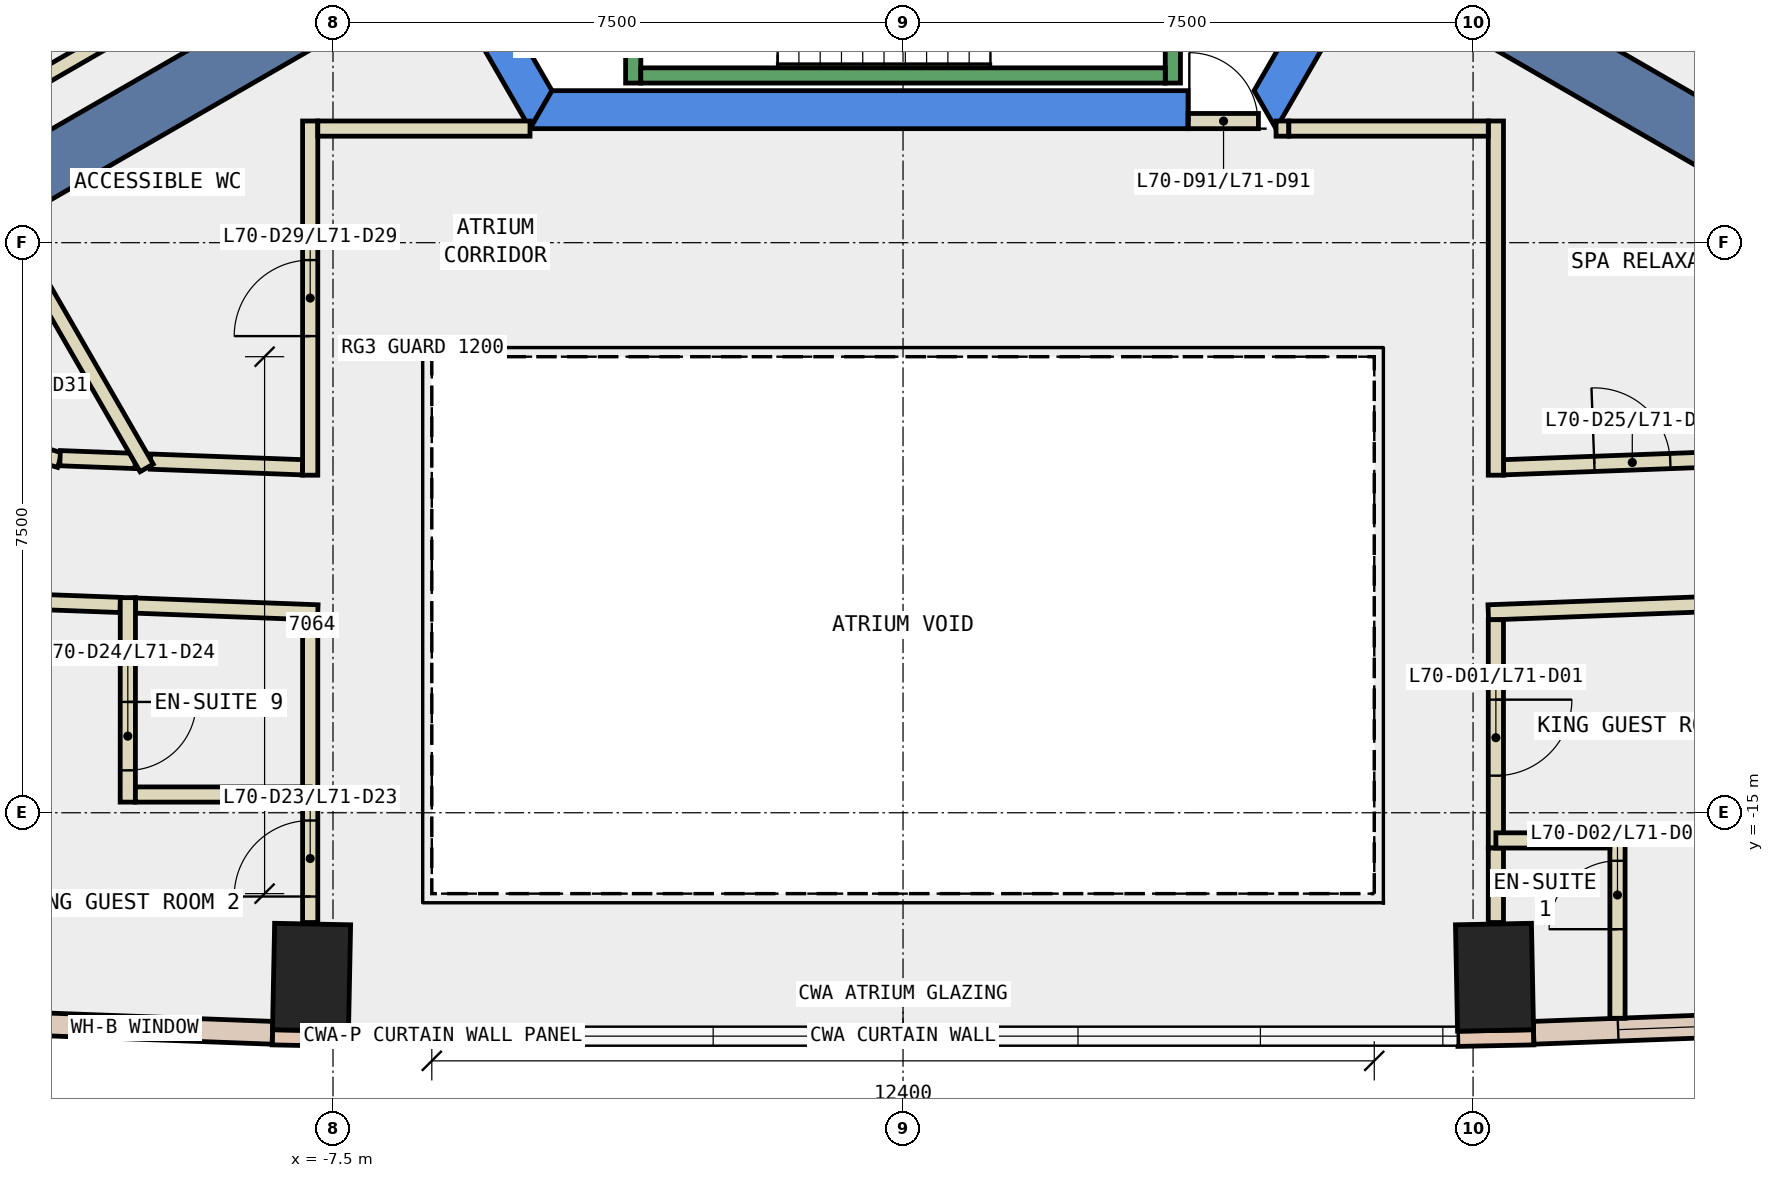
"""IFC4 building model, lengths in metres.
Left out: names, types, materials, properties, quantities, classifications, styles, units other than length and angle.
Written with IfcOpenShell. Run it as: python <this file> out.ifc"""

import sys

from ifc_helpers import new_model, si_unit, direction, frame, frame_2d, origin, origin_2d, place, context, subcontext, project, spatial, polyline, rectangle, outline, extrude, element, fill, save


model = new_model("IFC4")
c1 = context("Model", 3, precision=1e-05, world=origin(), true_north=direction((0.0, 1.0)))
c2 = subcontext(c1, "Body", "Model", "MODEL_VIEW")
j1 = project(units=[si_unit("LENGTHUNIT", "METRE"), si_unit("PLANEANGLEUNIT", "RADIAN")], contexts=[c1])
p1 = place(None, origin())
s1 = spatial("IfcSite", under=j1, at=p1, CompositionType="ELEMENT")
p2 = place(p1, origin())
s2 = spatial("IfcBuilding", under=s1, at=p2, CompositionType="ELEMENT")
p3 = place(p2, frame((0.0, 0.0, 300.8)))
s3 = spatial("IfcBuildingStorey", under=s2, at=p3, CompositionType="ELEMENT", Elevation=300.8)
for number, where, z_axis, x_axis in (
    (1, (-7.782, -17.164, -0.34), (0.0, 0.0, 1.0), (-1.0, 0.02, 0.0)),
    (2, (7.782, -17.164, -0.34), (0.0, 0.0, 1.0), (1.0, 0.02, 0.0)),
):
    element("IfcColumn", number, at=place(p3, frame(where, z_axis=z_axis, x_axis=x_axis)), inside=s3, PredefinedType="COLUMN", context=c2, shape_type="SweptSolid", body=[
        extrude(rectangle(XDim=1.0, YDim=1.4, at=origin_2d()), origin(), (0.0, 0.0, 1.0), 3.6),
    ])
p4 = place(p3, frame((0.0, 0.0, -0.34)))
e3 = element("IfcWall", 3, at=p4, inside=s3, PredefinedType="SHEAR", context=c2, shape_type="SweptSolid", body=[
    extrude(outline(polyline([(-9.815, 2.5), (-4.907, -6.0), (-4.619, -5.5), (-9.238, 2.5), (-9.815, 2.5)])), origin(), (0.0, 0.0, 1.0), 3.6),
])
p5 = place(p3, frame((0.0, 0.0, -0.34)))
e4 = element("IfcWall", 4, at=p5, inside=s3, PredefinedType="SHEAR", context=c2, shape_type="SweptSolid", body=[
    extrude(outline(polyline([(3.75, -6.0), (3.75, -5.5), (-4.619, -5.5), (-4.907, -6.0), (3.75, -6.0)])), origin(), (0.0, 0.0, 1.0), 3.6),
])
p6 = place(p3, frame((0.0, 0.0, -0.34)))
e5 = element("IfcWall", 5, at=p6, inside=s3, PredefinedType="SHEAR", context=c2, shape_type="SweptSolid", body=[
    extrude(outline(polyline([(4.907, -6.0), (9.815, 2.5), (9.238, 2.5), (4.619, -5.5), (4.907, -6.0)])), origin(), (0.0, 0.0, 1.0), 3.6),
])
for number, where, z_axis, x_axis in (
    (6, (6.279, -3.625, -0.34), (0.0, 0.0, 1.0), (0.866, -0.5, 0.0)),
    (7, (-6.279, -3.625, -0.34), (0.0, 0.0, 1.0), (-0.866, -0.5, 0.0)),
):
    element("IfcWall", number, at=place(p3, frame(where, z_axis=z_axis, x_axis=x_axis)), inside=s3, PredefinedType="SHEAR", context=c2, shape_type="SweptSolid", body=[
        extrude(rectangle(XDim=9.0, YDim=0.8, at=frame_2d((4.5, 0.0))), origin(), (0.0, 0.0, 1.0), 3.6),
    ])
for number, where, z_axis, x_axis in (
    (8, (-8.298, -17.954, 0.0), (0.0, 0.0, 1.0), (1.0, -0.02, 0.0)),
    (9, (7.298, -17.974, 0.0), (0.0, 0.0, 1.0), (1.0, 0.02, 0.0)),
):
    element("IfcWall", number, at=place(p3, frame(where, z_axis=z_axis, x_axis=x_axis)), inside=s3, PredefinedType="STANDARD", context=c2, shape_type="SweptSolid", body=[
        extrude(rectangle(XDim=1.0, YDim=0.2, at=frame_2d((0.5, 0.0))), origin(), (0.0, 0.0, 1.0), 3.26),
    ])
p7 = place(p3, frame((-11.92, -17.76, 0.0), z_axis=(0.0, 0.0, 1.0), x_axis=(0.999306787149, -0.037228284377, 0.0)))
e10 = element("IfcWall", 10, at=p7, inside=s3, PredefinedType="STANDARD", context=c2, shape_type="SweptSolid", body=[
    extrude(rectangle(XDim=3.626, YDim=0.3, at=frame_2d((1.813, 0.0))), origin(), (0.0, 0.0, 1.0), 3.26),
])
p8 = place(p7, frame((1.113, 0.0, 0.9)))
e11 = element("IfcOpeningElement", 11, at=p8, cuts=e10, PredefinedType="OPENING", context=c2, shape_type="SweptSolid", body=[
    extrude(rectangle(XDim=1.4, YDim=2.0, at=frame_2d((0.7, 1.0))), frame((0.0, 0.16, 0.0), z_axis=(0.0, -1.0, 0.0), x_axis=(1.0, 0.0, 0.0)), (0.0, 0.0, 1.0), 0.32),
])
p9 = place(p3, frame((8.296, -17.895, 0.0), z_axis=(0.0, 0.0, 1.0), x_axis=(0.999306787149, 0.037228284377, 0.0)))
e12 = element("IfcWall", 12, at=p9, inside=s3, PredefinedType="STANDARD", context=c2, shape_type="SweptSolid", body=[
    extrude(rectangle(XDim=3.626, YDim=0.3, at=frame_2d((1.813, 0.0))), origin(), (0.0, 0.0, 1.0), 3.26),
])
p10 = place(p9, frame((1.113, 0.0, 0.9)))
e13 = element("IfcOpeningElement", 13, at=p10, cuts=e12, PredefinedType="OPENING", context=c2, shape_type="SweptSolid", body=[
    extrude(rectangle(XDim=1.4, YDim=2.0, at=frame_2d((0.7, 1.0))), frame((0.0, 0.16, 0.0), z_axis=(0.0, -1.0, 0.0), x_axis=(1.0, 0.0, 0.0)), (0.0, 0.0, 1.0), 0.32),
])
p11 = place(p3, frame((7.9, -10.455, 0.0), z_axis=(0.0, 0.0, 1.0), x_axis=(0.999297278907, 0.037482640915, 0.0)))
e14 = element("IfcWall", 14, at=p11, inside=s3, PredefinedType="PARTITIONING", context=c2, shape_type="SweptSolid", body=[
    extrude(rectangle(XDim=3.394, YDim=0.2, at=frame_2d((1.697, 0.0))), origin(), (0.0, 0.0, 1.0), 3.26),
])
p12 = place(p11, frame((1.196, 0.0, 0.0)))
e15 = element("IfcOpeningElement", 15, at=p12, cuts=e14, PredefinedType="OPENING", context=c2, shape_type="SweptSolid", body=[
    extrude(rectangle(XDim=1.0, YDim=2.1, at=frame_2d((0.5, 1.05))), frame((0.0, 0.11, 0.0), z_axis=(0.0, -1.0, 0.0), x_axis=(1.0, 0.0, 0.0)), (0.0, 0.0, 1.0), 0.22),
])
p13 = place(p3, frame((-9.902, -10.38, 0.0), z_axis=(0.0, 0.0, 1.0), x_axis=(0.999295503749, -0.037529937222, 0.0)))
e16 = element("IfcWall", 16, at=p13, inside=s3, PredefinedType="PARTITIONING", context=c2, shape_type="SweptSolid", body=[
    extrude(rectangle(XDim=2.004, YDim=0.2, at=frame_2d((1.002, 0.0))), origin(), (0.0, 0.0, 1.0), 3.26),
])
p14 = place(p3, frame((-13.787, -9.55, 0.0), z_axis=(0.0, 0.0, 1.0), x_axis=(0.957493454064, -0.288454997225, 0.0)))
e17 = element("IfcWall", 17, at=p14, inside=s3, PredefinedType="PARTITIONING", context=c2, shape_type="SweptSolid", body=[
    extrude(rectangle(XDim=2.812, YDim=0.2, at=frame_2d((1.406, 0.0))), origin(), (0.0, 0.0, 1.0), 3.26),
])
p15 = place(p14, frame((0.906, 0.0, 0.0)))
e18 = element("IfcOpeningElement", 18, at=p15, cuts=e17, PredefinedType="OPENING", context=c2, shape_type="SweptSolid", body=[
    extrude(rectangle(XDim=1.0, YDim=2.1, at=frame_2d((0.5, 1.05))), frame((0.0, 0.11, 0.0), z_axis=(0.0, -1.0, 0.0), x_axis=(1.0, 0.0, 0.0)), (0.0, 0.0, 1.0), 0.22),
])
p16 = place(p3, frame((-11.091, -10.335, 0.0), z_axis=(0.0, 0.0, 1.0), x_axis=(0.999296807198, -0.037495214686, 0.0)))
e19 = element("IfcWall", 19, at=p16, inside=s3, PredefinedType="PARTITIONING", context=c2, shape_type="SweptSolid", body=[
    extrude(rectangle(XDim=0.99, YDim=0.2, at=frame_2d((0.495, 0.0))), origin(), (0.0, 0.0, 1.0), 3.26),
])
p17 = place(p3, frame((11.53, -12.22, 0.0), z_axis=(0.0, 0.0, 1.0), x_axis=(-0.999293554816, -0.037581794833, 0.0)))
e20 = element("IfcWall", 20, at=p17, inside=s3, PredefinedType="PARTITIONING", context=c2, shape_type="SweptSolid", body=[
    extrude(rectangle(XDim=3.833, YDim=0.2, at=frame_2d((1.917, 0.0))), origin(), (0.0, 0.0, 1.0), 3.26),
])
p18 = place(p3, frame((-10.299, -12.266, 0.0), z_axis=(0.0, 0.0, 1.0), x_axis=(-0.999313019426, 0.03706061529, 0.0)))
e21 = element("IfcWall", 21, at=p18, inside=s3, PredefinedType="PARTITIONING", context=c2, shape_type="SweptSolid", body=[
    extrude(rectangle(XDim=1.107, YDim=0.2, at=frame_2d((0.553, 0.0))), origin(), (0.0, 0.0, 1.0), 3.26),
])
p19 = place(p3, frame((-7.7, -12.364, 0.0), z_axis=(0.0, 0.0, 1.0), x_axis=(-0.999295758095, 0.037523164215, 0.0)))
e22 = element("IfcWall", 22, at=p19, inside=s3, PredefinedType="PARTITIONING", context=c2, shape_type="SweptSolid", body=[
    extrude(rectangle(XDim=2.401, YDim=0.2, at=frame_2d((1.2, 0.0))), origin(), (0.0, 0.0, 1.0), 3.26),
])
p20 = place(p3, frame((4.908, -5.999, 0.0), z_axis=(0.0, 0.0, 1.0), x_axis=(1.0, 0.0, 0.0)))
e23 = element("IfcWall", 23, at=p20, inside=s3, PredefinedType="PARTITIONING", context=c2, shape_type="SweptSolid", body=[
    extrude(rectangle(XDim=0.168, YDim=0.2, at=frame_2d((0.084, 0.0))), origin(), (0.0, 0.0, 1.0), 2.4),
])
p21 = place(p3, frame((7.8, -5.899, 0.0), z_axis=(0.0, 0.0, 1.0), x_axis=(0.0, -1.0, 0.0)))
e24 = element("IfcWall", 24, at=p21, inside=s3, PredefinedType="PARTITIONING", context=c2, shape_type="SweptSolid", body=[
    extrude(rectangle(XDim=4.66, YDim=0.2, at=frame_2d((2.33, 0.0))), origin(), (0.0, 0.0, 1.0), 3.26),
])
p22 = place(p3, frame((-7.8, -10.559, 0.0), z_axis=(0.0, 0.0, 1.0), x_axis=(0.0, 1.0, 0.0)))
e25 = element("IfcWall", 25, at=p22, inside=s3, PredefinedType="PARTITIONING", context=c2, shape_type="SweptSolid", body=[
    extrude(rectangle(XDim=4.66, YDim=0.2, at=frame_2d((2.33, 0.0))), origin(), (0.0, 0.0, 1.0), 3.26),
])
p23 = place(p22, frame((1.83, 0.0, 0.0)))
e26 = element("IfcOpeningElement", 26, at=p23, cuts=e25, PredefinedType="OPENING", context=c2, shape_type="SweptSolid", body=[
    extrude(rectangle(XDim=1.0, YDim=2.1, at=frame_2d((0.5, 1.05))), frame((0.0, 0.11, 0.0), z_axis=(0.0, -1.0, 0.0), x_axis=(1.0, 0.0, 0.0)), (0.0, 0.0, 1.0), 0.22),
])
p24 = place(p3, frame((-7.7, -5.999, 0.0), z_axis=(0.0, 0.0, 1.0), x_axis=(1.0, 0.0, 0.0)))
e27 = element("IfcWall", 27, at=p24, inside=s3, PredefinedType="PARTITIONING", context=c2, shape_type="SweptSolid", body=[
    extrude(rectangle(XDim=2.792, YDim=0.2, at=frame_2d((1.396, 0.0))), origin(), (0.0, 0.0, 1.0), 3.26),
])
p25 = place(p3, frame((7.8, -12.46, 0.0), z_axis=(0.0, 0.0, 1.0), x_axis=(0.0, -1.0, 0.0)))
e28 = element("IfcWall", 28, at=p25, inside=s3, PredefinedType="PARTITIONING", context=c2, shape_type="SweptSolid", body=[
    extrude(rectangle(XDim=3.004, YDim=0.2, at=frame_2d((1.502, 0.0))), origin(), (0.0, 0.0, 1.0), 3.26),
])
p26 = place(p25, frame((1.052, 0.0, 0.0)))
e29 = element("IfcOpeningElement", 29, at=p26, cuts=e28, PredefinedType="OPENING", context=c2, shape_type="SweptSolid", body=[
    extrude(rectangle(XDim=1.0, YDim=2.1, at=frame_2d((0.5, 1.05))), frame((0.0, 0.11, 0.0), z_axis=(0.0, -1.0, 0.0), x_axis=(1.0, 0.0, 0.0)), (0.0, 0.0, 1.0), 0.22),
])
p27 = place(p3, frame((7.8, -15.464, 0.0), z_axis=(0.0, 0.0, 1.0), x_axis=(0.0, -1.0, 0.0)))
e30 = element("IfcWall", 30, at=p27, inside=s3, PredefinedType="PARTITIONING", context=c2, shape_type="SweptSolid", body=[
    extrude(rectangle(XDim=0.98, YDim=0.2, at=frame_2d((0.49, 0.0))), origin(), (0.0, 0.0, 1.0), 3.26),
])
p28 = place(p3, frame((-7.8, -16.444, 0.0), z_axis=(0.0, 0.0, 1.0), x_axis=(0.0, 1.0, 0.0)))
e31 = element("IfcWall", 31, at=p28, inside=s3, PredefinedType="PARTITIONING", context=c2, shape_type="SweptSolid", body=[
    extrude(rectangle(XDim=1.584, YDim=0.2, at=frame_2d((0.792, 0.0))), origin(), (0.0, 0.0, 1.0), 3.26),
])
p29 = place(p28, frame((0.342, 0.0, 0.0)))
e32 = element("IfcOpeningElement", 32, at=p29, cuts=e31, PredefinedType="OPENING", context=c2, shape_type="SweptSolid", body=[
    extrude(rectangle(XDim=1.0, YDim=2.1, at=frame_2d((0.5, 1.05))), frame((0.0, 0.11, 0.0), z_axis=(0.0, -1.0, 0.0), x_axis=(1.0, 0.0, 0.0)), (0.0, 0.0, 1.0), 0.22),
])
p30 = place(p3, frame((-7.8, -14.86, 0.0), z_axis=(0.0, 0.0, 1.0), x_axis=(0.0, 1.0, 0.0)))
e33 = element("IfcWall", 33, at=p30, inside=s3, PredefinedType="PARTITIONING", context=c2, shape_type="SweptSolid", body=[
    extrude(rectangle(XDim=2.4, YDim=0.2, at=frame_2d((1.2, 0.0))), origin(), (0.0, 0.0, 1.0), 3.26),
])
p31 = place(p3, frame((6.835, -2.662, 0.0), z_axis=(0.0, 0.0, 1.0), x_axis=(0.866023427642, -0.500003422764, 0.0)))
e34 = element("IfcWall", 34, at=p31, inside=s3, PredefinedType="PARTITIONING", context=c2, shape_type="SweptSolid", body=[
    extrude(rectangle(XDim=8.65, YDim=0.1, at=frame_2d((4.325, 0.0))), origin(), (0.0, 0.0, 1.0), 3.26),
])
p32 = place(p3, frame((-6.804, -2.714, 0.0), z_axis=(0.0, 0.0, 1.0), x_axis=(-0.866057565063, -0.499944290893, 0.0)))
e35 = element("IfcWall", 35, at=p32, inside=s3, PredefinedType="PARTITIONING", context=c2, shape_type="SweptSolid", body=[
    extrude(rectangle(XDim=6.7, YDim=0.2, at=frame_2d((3.35, 0.0))), origin(), (0.0, 0.0, 1.0), 3.26),
])
p33 = place(p3, frame((-9.952, -10.463, 0.0), z_axis=(0.0, 0.0, 1.0), x_axis=(-0.499837150608, 0.866119404512, 0.0)))
e36 = element("IfcWall", 36, at=p33, inside=s3, PredefinedType="PARTITIONING", context=c2, shape_type="SweptSolid", body=[
    extrude(rectangle(XDim=3.685, YDim=0.2, at=frame_2d((1.843, 0.0))), origin(), (0.0, 0.0, 1.0), 3.26),
])
p34 = place(p3, frame((9.4, -17.704, 0.0), z_axis=(0.0, 0.0, 1.0), x_axis=(0.0, 1.0, 0.0)))
e37 = element("IfcWall", 37, at=p34, inside=s3, PredefinedType="PARTITIONING", context=c2, shape_type="SweptSolid", body=[
    extrude(rectangle(XDim=2.44, YDim=0.2, at=frame_2d((1.22, 0.0))), origin(), (0.0, 0.0, 1.0), 3.26),
])
p35 = place(p34, frame((1.172, 0.0, 0.0)))
e38 = element("IfcOpeningElement", 38, at=p35, cuts=e37, PredefinedType="OPENING", context=c2, shape_type="SweptSolid", body=[
    extrude(rectangle(XDim=0.9, YDim=2.1, at=frame_2d((0.45, 1.05))), frame((0.0, 0.11, 0.0), z_axis=(0.0, -1.0, 0.0), x_axis=(1.0, 0.0, 0.0)), (0.0, 0.0, 1.0), 0.22),
])
p36 = place(p3, frame((9.3, -15.364, 0.0), z_axis=(0.0, 0.0, 1.0), x_axis=(-1.0, 0.0, 0.0)))
e39 = element("IfcWall", 39, at=p36, inside=s3, PredefinedType="PARTITIONING", context=c2, shape_type="SweptSolid", body=[
    extrude(rectangle(XDim=1.5, YDim=0.2, at=frame_2d((0.75, 0.0))), origin(), (0.0, 0.0, 1.0), 3.26),
])
p37 = place(p3, frame((-10.199, -12.17, 0.0), z_axis=(0.0, 0.0, 1.0), x_axis=(-0.000363009324, -0.999999934112, 0.0)))
e40 = element("IfcWall", 40, at=p37, inside=s3, PredefinedType="PARTITIONING", context=c2, shape_type="SweptSolid", body=[
    extrude(rectangle(XDim=2.69, YDim=0.2, at=frame_2d((1.345, 0.0))), origin(), (0.0, 0.0, 1.0), 3.26),
])
p38 = place(p37, frame((1.372, 0.0, 0.0)))
e41 = element("IfcOpeningElement", 41, at=p38, cuts=e40, PredefinedType="OPENING", context=c2, shape_type="SweptSolid", body=[
    extrude(rectangle(XDim=0.9, YDim=2.1, at=frame_2d((0.45, 1.05))), frame((0.0, 0.11, 0.0), z_axis=(0.0, -1.0, 0.0), x_axis=(1.0, 0.0, 0.0)), (0.0, 0.0, 1.0), 0.22),
])
p39 = place(p3, frame((-10.1, -14.76, 0.0), z_axis=(0.0, 0.0, 1.0), x_axis=(1.0, 0.0, 0.0)))
e42 = element("IfcWall", 42, at=p39, inside=s3, PredefinedType="PARTITIONING", context=c2, shape_type="SweptSolid", body=[
    extrude(rectangle(XDim=2.3, YDim=0.2, at=frame_2d((1.15, 0.0))), origin(), (0.0, 0.0, 1.0), 3.26),
])
p40 = place(p3, frame((3.75, -5.9, 0.0), z_axis=(0.0, 0.0, 1.0), x_axis=(1.0, 0.0, 0.0)))
e43 = element("IfcWall", 43, at=p40, inside=s3, PredefinedType="PARTITIONING", context=c2, shape_type="SweptSolid", body=[
    extrude(rectangle(XDim=0.926, YDim=0.2, at=frame_2d((0.463, 0.0))), origin(), (0.0, 0.0, 1.0), 2.4),
])
p41 = place(p40, frame((0.017, 0.0, 0.0)))
e44 = element("IfcOpeningElement", 44, at=p41, cuts=e43, PredefinedType="OPENING", context=c2, shape_type="SweptSolid", body=[
    extrude(rectangle(XDim=0.9, YDim=2.1, at=frame_2d((0.45, 1.05))), frame((0.0, 0.11, 0.0), z_axis=(0.0, -1.0, 0.0), x_axis=(1.0, 0.0, 0.0)), (0.0, 0.0, 1.0), 0.22),
])
p42 = place(p3, frame((5.076, -5.999, 0.0), z_axis=(0.0, 0.0, 1.0), x_axis=(1.0, 0.0, 0.0)))
e45 = element("IfcWall", 45, at=p42, inside=s3, PredefinedType="PARTITIONING", context=c2, shape_type="SweptSolid", body=[
    extrude(rectangle(XDim=2.624, YDim=0.2, at=frame_2d((1.312, 0.0))), origin(), (0.0, 0.0, 1.0), 3.26),
])
p43 = place(p3, frame((-3.55, -1.0, 0.0), z_axis=(0.0, 0.0, 1.0), x_axis=(0.0, -1.0, 0.0)))
e46 = element("IfcWall", 46, at=p43, inside=s3, PredefinedType="STANDARD", context=c2, shape_type="SweptSolid", body=[
    extrude(rectangle(XDim=4.4, YDim=0.2, at=frame_2d((2.2, 0.0))), origin(), (0.0, 0.0, 1.0), 3.26),
])
p44 = place(p43, frame((2.4, 0.0, 0.0)))
e47 = element("IfcOpeningElement", 47, at=p44, cuts=e46, PredefinedType="OPENING", context=c2, shape_type="SweptSolid", body=[
    extrude(rectangle(XDim=1.1, YDim=2.2, at=frame_2d((0.55, 1.1))), frame((0.0, 0.11, 0.0), z_axis=(0.0, -1.0, 0.0), x_axis=(1.0, 0.0, 0.0)), (0.0, 0.0, 1.0), 0.22),
])
p45 = place(p3, frame((3.55, -2.667, 0.0), z_axis=(0.0, 0.0, 1.0), x_axis=(0.0, -1.0, 0.0)))
e48 = element("IfcWall", 48, at=p45, inside=s3, PredefinedType="STANDARD", context=c2, shape_type="SweptSolid", body=[
    extrude(rectangle(XDim=2.733, YDim=0.2, at=frame_2d((1.366, 0.0))), origin(), (0.0, 0.0, 1.0), 3.26),
])
p46 = place(p3, frame((-3.45, -5.3, 0.0), z_axis=(0.0, 0.0, 1.0), x_axis=(1.0, 0.0, 0.0)))
e49 = element("IfcWall", 49, at=p46, inside=s3, PredefinedType="STANDARD", context=c2, shape_type="SweptSolid", body=[
    extrude(rectangle(XDim=6.9, YDim=0.2, at=frame_2d((3.45, 0.0))), origin(), (0.0, 0.0, 1.0), 3.26),
])
p47 = place(p8, origin())
e50 = element("IfcWindow", 50, at=p47, inside=s3, PartitioningType="SINGLE_PANEL", PredefinedType="WINDOW", context=c2, shape_type="SweptSolid", body=[
    extrude(rectangle(XDim=1.4, YDim=2.0, at=frame_2d((0.7, 1.0))), frame((0.0, 0.03, 0.0), z_axis=(0.0, -1.0, 0.0), x_axis=(1.0, 0.0, 0.0)), (0.0, 0.0, 1.0), 0.06),
])
fill(e11, e50)
p48 = place(p10, origin())
e51 = element("IfcWindow", 51, at=p48, inside=s3, PartitioningType="SINGLE_PANEL", PredefinedType="WINDOW", context=c2, shape_type="SweptSolid", body=[
    extrude(rectangle(XDim=1.4, YDim=2.0, at=frame_2d((0.7, 1.0))), frame((0.0, 0.03, 0.0), z_axis=(0.0, -1.0, 0.0), x_axis=(1.0, 0.0, 0.0)), (0.0, 0.0, 1.0), 0.06),
])
fill(e13, e51)
p49 = place(p26, origin())
e52 = element("IfcDoor", 52, at=p49, inside=s3, OperationType="SINGLE_SWING_RIGHT", PredefinedType="DOOR", context=c2, shape_type="SweptSolid", body=[
    extrude(rectangle(XDim=1.0, YDim=2.1, at=frame_2d((0.5, 1.05))), frame((0.0, 0.025, 0.0), z_axis=(0.0, -1.0, 0.0), x_axis=(1.0, 0.0, 0.0)), (0.0, 0.0, 1.0), 0.05),
])
fill(e29, e52)
p50 = place(p35, origin())
e53 = element("IfcDoor", 53, at=p50, inside=s3, OperationType="SINGLE_SWING_RIGHT", PredefinedType="DOOR", context=c2, shape_type="SweptSolid", body=[
    extrude(rectangle(XDim=0.9, YDim=2.1, at=frame_2d((0.45, 1.05))), frame((0.0, 0.025, 0.0), z_axis=(0.0, -1.0, 0.0), x_axis=(1.0, 0.0, 0.0)), (0.0, 0.0, 1.0), 0.05),
])
fill(e38, e53)
p51 = place(p29, origin())
e54 = element("IfcDoor", 54, at=p51, inside=s3, OperationType="SINGLE_SWING_RIGHT", PredefinedType="DOOR", context=c2, shape_type="SweptSolid", body=[
    extrude(rectangle(XDim=1.0, YDim=2.1, at=frame_2d((0.5, 1.05))), frame((0.0, 0.025, 0.0), z_axis=(0.0, -1.0, 0.0), x_axis=(1.0, 0.0, 0.0)), (0.0, 0.0, 1.0), 0.05),
])
fill(e32, e54)
p52 = place(p38, origin())
e55 = element("IfcDoor", 55, at=p52, inside=s3, OperationType="SINGLE_SWING_RIGHT", PredefinedType="DOOR", context=c2, shape_type="SweptSolid", body=[
    extrude(rectangle(XDim=0.9, YDim=2.1, at=frame_2d((0.45, 1.05))), frame((0.0, 0.025, 0.0), z_axis=(0.0, -1.0, 0.0), x_axis=(1.0, 0.0, 0.0)), (0.0, 0.0, 1.0), 0.05),
])
fill(e41, e55)
p53 = place(p12, origin())
e56 = element("IfcDoor", 56, at=p53, inside=s3, OperationType="SINGLE_SWING_LEFT", PredefinedType="DOOR", context=c2, shape_type="SweptSolid", body=[
    extrude(rectangle(XDim=1.0, YDim=2.1, at=frame_2d((0.5, 1.05))), frame((0.0, 0.025, 0.0), z_axis=(0.0, -1.0, 0.0), x_axis=(1.0, 0.0, 0.0)), (0.0, 0.0, 1.0), 0.05),
])
fill(e15, e56)
p54 = place(p23, origin())
e57 = element("IfcDoor", 57, at=p54, inside=s3, OperationType="SINGLE_SWING_LEFT", PredefinedType="DOOR", context=c2, shape_type="SweptSolid", body=[
    extrude(rectangle(XDim=1.0, YDim=2.1, at=frame_2d((0.5, 1.05))), frame((0.0, 0.025, 0.0), z_axis=(0.0, -1.0, 0.0), x_axis=(1.0, 0.0, 0.0)), (0.0, 0.0, 1.0), 0.05),
])
fill(e26, e57)
p55 = place(p41, origin())
e58 = element("IfcDoor", 58, at=p55, inside=s3, OperationType="SINGLE_SWING_LEFT", PredefinedType="DOOR", context=c2, shape_type="SweptSolid", body=[
    extrude(rectangle(XDim=0.9, YDim=2.1, at=frame_2d((0.45, 1.05))), frame((0.0, 0.025, 0.0), z_axis=(0.0, -1.0, 0.0), x_axis=(1.0, 0.0, 0.0)), (0.0, 0.0, 1.0), 0.05),
])
fill(e44, e58)
save(model, sys.argv[1])
